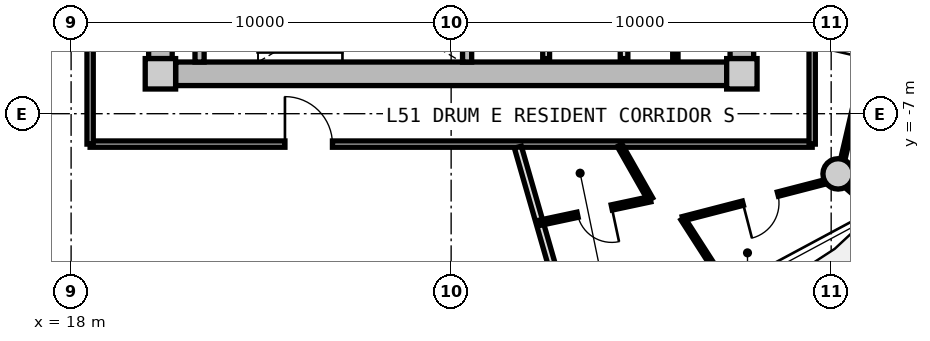
"""IFC4 building model, lengths in metres.
Left out: names, types, materials, properties, quantities, classifications, styles, units other than length and angle.
Written with IfcOpenShell. Run it as: python <this file> out.ifc"""

import sys

from ifc_helpers import new_model, si_unit, direction, frame, frame_2d, origin, origin_2d, place, context, subcontext, project, spatial, rectangle, circle, extrude, source, transform, mapped, element, fill, save


model = new_model("IFC4")
c1 = context("Model", 3, precision=1e-05, world=origin(), true_north=direction((0.0, 1.0)))
c2 = subcontext(c1, "Body", "Model", "MODEL_VIEW")
j1 = project(units=[si_unit("LENGTHUNIT", "METRE"), si_unit("PLANEANGLEUNIT", "RADIAN")], contexts=[c1])
p1 = place(None, origin())
s1 = spatial("IfcSite", under=j1, at=p1, CompositionType="ELEMENT")
p2 = place(p1, origin())
s2 = spatial("IfcBuilding", under=s1, at=p2, CompositionType="ELEMENT")
p3 = place(p2, frame((0.0, 0.0, 164.8)))
s3 = spatial("IfcBuildingStorey", under=s2, at=p3, CompositionType="ELEMENT", Elevation=164.8)
m1 = source(origin(), c2, "Body", "SweptSolid", [
    extrude(rectangle(XDim=0.8, YDim=0.8, at=origin_2d()), origin(), (0.0, 0.0, 1.0), 3.05),
])
for number, where, z_axis, x_axis in (
    (1, (20.35, -5.95, 0.0), (0.0, 0.0, 1.0), (1.0, 0.0, 0.0)),
    (2, (35.65, -5.95, 0.0), (0.0, 0.0, 1.0), (1.0, 0.0, 0.0)),
):
    element("IfcColumn", number, at=place(p3, frame(where, z_axis=z_axis, x_axis=x_axis)), inside=s3, PredefinedType="COLUMN", context=c2, shape_type="MappedRepresentation", body=[
        mapped(m1, transform((0.0, 0.0, 0.0), x_axis=(1.0, 0.0, 0.0), y_axis=(0.0, 1.0, 0.0), z_axis=(0.0, 0.0, 1.0), scale=1.0)),
    ])
m2 = source(origin(), c2, "Body", "SweptSolid", [
    extrude(rectangle(XDim=14.5, YDim=0.62, at=frame_2d((7.25, 0.0))), origin(), (0.0, 0.0, 1.0), 2.81),
])
p4 = place(p3, frame((35.25, -5.95, 0.0), z_axis=(0.0, 0.0, 1.0), x_axis=(-1.0, 0.0, 0.0)))
e3 = element("IfcWall", 3, at=p4, inside=s3, PredefinedType="SHEAR", context=c2, shape_type="MappedRepresentation", body=[
    mapped(m2, transform((0.0, 0.0, 0.0), x_axis=(1.0, 0.0, 0.0), y_axis=(0.0, 1.0, 0.0), z_axis=(0.0, 0.0, 1.0), scale=1.0)),
])
m3 = source(origin(), c2, "Body", "SweptSolid", [
    extrude(rectangle(XDim=11.1, YDim=0.62, at=frame_2d((5.55, 0.0))), origin(), (0.0, 0.0, 1.0), 2.81),
])
p5 = place(p3, frame((20.35, -5.55, 0.0), z_axis=(0.0, 0.0, 1.0), x_axis=(0.0, 1.0, 0.0)))
e4 = element("IfcWall", 4, at=p5, inside=s3, PredefinedType="SHEAR", context=c2, shape_type="MappedRepresentation", body=[
    mapped(m3, transform((0.0, 0.0, 0.0), x_axis=(1.0, 0.0, 0.0), y_axis=(0.0, 1.0, 0.0), z_axis=(0.0, 0.0, 1.0), scale=1.0)),
])
p6 = place(p5, frame((3.8, 0.0, 0.0)))
e5 = element("IfcOpeningElement", 5, at=p6, cuts=e4, PredefinedType="OPENING", context=c2, shape_type="SweptSolid", body=[
    extrude(rectangle(XDim=1.2, YDim=2.15, at=frame_2d((0.6, 1.075))), frame((0.0, 0.32, 0.0), z_axis=(0.0, -1.0, 0.0), x_axis=(1.0, 0.0, 0.0)), (0.0, 0.0, 1.0), 0.64),
])
p7 = place(p3, frame((35.65, 5.55, 0.0), z_axis=(0.0, 0.0, 1.0), x_axis=(0.0, -1.0, 0.0)))
e6 = element("IfcWall", 6, at=p7, inside=s3, PredefinedType="SHEAR", context=c2, shape_type="MappedRepresentation", body=[
    mapped(m3, transform((0.0, 0.0, 0.0), x_axis=(1.0, 0.0, 0.0), y_axis=(0.0, 1.0, 0.0), z_axis=(0.0, 0.0, 1.0), scale=1.0)),
])
p8 = place(p7, frame((5.65, 0.0, 0.0)))
e7 = element("IfcOpeningElement", 7, at=p8, cuts=e6, PredefinedType="OPENING", context=c2, shape_type="SweptSolid", body=[
    extrude(rectangle(XDim=1.2, YDim=2.15, at=frame_2d((0.6, 1.075))), frame((0.0, 0.32, 0.0), z_axis=(0.0, -1.0, 0.0), x_axis=(1.0, 0.0, 0.0)), (0.0, 0.0, 1.0), 0.64),
])
m4 = source(origin(), c2, "Body", "SweptSolid", [
    extrude(circle(Radius=0.4, at=origin_2d()), origin(), (0.0, 0.0, 1.0), 3.05),
])
p9 = place(p3, frame((38.183, -8.584, 0.0), z_axis=(0.0, 0.0, 1.0), x_axis=(1.0, 0.0, 0.0)))
e8 = element("IfcColumn", 8, at=p9, inside=s3, PredefinedType="COLUMN", context=c2, shape_type="MappedRepresentation", body=[
    mapped(m4, transform((0.0, 0.0, 0.0), x_axis=(1.0, 0.0, 0.0), y_axis=(0.0, 1.0, 0.0), z_axis=(0.0, 0.0, 1.0), scale=1.0)),
])
m5 = source(origin(), c2, "Body", "SweptSolid", [
    extrude(rectangle(XDim=3.19, YDim=0.24, at=frame_2d((1.595, 0.0))), origin(), (0.0, 0.0, 1.0), 2.81),
])
for number, where, z_axis, x_axis in (
    (9, (21.38, -5.64, 0.0), (0.0, 0.0, 1.0), (0.0, 1.0, 0.0)),
    (10, (28.42, -5.64, 0.0), (0.0, 0.0, 1.0), (0.0, 1.0, 0.0)),
):
    element("IfcWall", number, at=place(p3, frame(where, z_axis=z_axis, x_axis=x_axis)), inside=s3, PredefinedType="PARTITIONING", context=c2, shape_type="MappedRepresentation", body=[
        mapped(m5, transform((0.0, 0.0, 0.0), x_axis=(1.0, 0.0, 0.0), y_axis=(0.0, 1.0, 0.0), z_axis=(0.0, 0.0, 1.0), scale=1.0)),
    ])
m6 = source(origin(), c2, "Body", "SweptSolid", [
    extrude(rectangle(XDim=3.8, YDim=0.2, at=frame_2d((1.9, 0.0))), origin(), (0.0, 0.0, 1.0), 2.795),
])
p10 = place(p3, frame((32.55, -5.55, 0.0), z_axis=(0.0, 0.0, 1.0), x_axis=(0.0, 1.0, 0.0)))
e11 = element("IfcWall", 11, at=p10, inside=s3, PredefinedType="PARTITIONING", context=c2, shape_type="MappedRepresentation", body=[
    mapped(m6, transform((0.0, 0.0, 0.0), x_axis=(1.0, 0.0, 0.0), y_axis=(0.0, 1.0, 0.0), z_axis=(0.0, 0.0, 1.0), scale=1.0)),
])
m7 = source(origin(), c2, "Body", "SweptSolid", [
    extrude(rectangle(XDim=4.2, YDim=0.18, at=frame_2d((2.1, 0.0))), origin(), (0.0, 0.0, 1.0), 2.795),
])
p11 = place(p3, frame((30.5, -5.55, 0.0), z_axis=(0.0, 0.0, 1.0), x_axis=(0.0, 1.0, 0.0)))
e12 = element("IfcWall", 12, at=p11, inside=s3, PredefinedType="PARTITIONING", context=c2, shape_type="MappedRepresentation", body=[
    mapped(m7, transform((0.0, 0.0, 0.0), x_axis=(1.0, 0.0, 0.0), y_axis=(0.0, 1.0, 0.0), z_axis=(0.0, 0.0, 1.0), scale=1.0)),
])
m8 = source(origin(), c2, "Body", "SweptSolid", [
    extrude(rectangle(XDim=3.8, YDim=0.14, at=frame_2d((1.9, 0.0))), origin(), (0.0, 0.0, 1.0), 2.795),
])
p12 = place(p3, frame((33.9, -5.55, 0.0), z_axis=(0.0, 0.0, 1.0), x_axis=(0.0, 1.0, 0.0)))
e13 = element("IfcWall", 13, at=p12, inside=s3, PredefinedType="PARTITIONING", context=c2, shape_type="MappedRepresentation", body=[
    mapped(m8, transform((0.0, 0.0, 0.0), x_axis=(1.0, 0.0, 0.0), y_axis=(0.0, 1.0, 0.0), z_axis=(0.0, 0.0, 1.0), scale=1.0)),
])
m9 = source(origin(), c2, "Body", "SweptSolid", [
    extrude(rectangle(XDim=19.0, YDim=0.165, at=frame_2d((9.5, 0.0))), origin(), (0.0, 0.0, 1.0), 2.795),
])
p13 = place(p3, frame((37.5, -7.8, 0.0), z_axis=(0.0, 0.0, 1.0), x_axis=(-1.0, 0.0, 0.0)))
e14 = element("IfcWall", 14, at=p13, inside=s3, PredefinedType="PARTITIONING", context=c2, shape_type="MappedRepresentation", body=[
    mapped(m9, transform((0.0, 0.0, 0.0), x_axis=(1.0, 0.0, 0.0), y_axis=(0.0, 1.0, 0.0), z_axis=(0.0, 0.0, 1.0), scale=1.0)),
])
p14 = place(p13, frame((12.623, 0.0, 0.0)))
e15 = element("IfcOpeningElement", 15, at=p14, cuts=e14, PredefinedType="OPENING", context=c2, shape_type="SweptSolid", body=[
    extrude(rectangle(XDim=1.25, YDim=2.2, at=frame_2d((0.625, 1.1))), frame((0.0, 0.093, 0.0), z_axis=(0.0, -1.0, 0.0), x_axis=(1.0, 0.0, 0.0)), (0.0, 0.0, 1.0), 0.185),
])
m10 = source(origin(), c2, "Body", "SweptSolid", [
    extrude(rectangle(XDim=7.365, YDim=0.165, at=frame_2d((3.682, 0.0))), origin(), (0.0, 0.0, 1.0), 2.795),
])
p15 = place(p3, frame((18.5, -7.8, 0.0), z_axis=(0.0, 0.0, 1.0), x_axis=(0.0, 1.0, 0.0)))
e16 = element("IfcWall", 16, at=p15, inside=s3, PredefinedType="PARTITIONING", context=c2, shape_type="MappedRepresentation", body=[
    mapped(m10, transform((0.0, 0.0, 0.0), x_axis=(1.0, 0.0, 0.0), y_axis=(0.0, 1.0, 0.0), z_axis=(0.0, 0.0, 1.0), scale=1.0)),
])
m11 = source(origin(), c2, "Body", "SweptSolid", [
    extrude(rectangle(XDim=6.88, YDim=0.165, at=frame_2d((3.44, 0.0))), origin(), (0.0, 0.0, 1.0), 2.795),
])
p16 = place(p3, frame((37.5, -0.92, 0.0), z_axis=(0.0, 0.0, 1.0), x_axis=(0.0, -1.0, 0.0)))
e17 = element("IfcWall", 17, at=p16, inside=s3, PredefinedType="PARTITIONING", context=c2, shape_type="MappedRepresentation", body=[
    mapped(m11, transform((0.0, 0.0, 0.0), x_axis=(1.0, 0.0, 0.0), y_axis=(0.0, 1.0, 0.0), z_axis=(0.0, 0.0, 1.0), scale=1.0)),
])
p17 = place(p16, frame((2.915, 0.0, 0.0)))
e18 = element("IfcOpeningElement", 18, at=p17, cuts=e17, PredefinedType="OPENING", context=c2, shape_type="SweptSolid", body=[
    extrude(rectangle(XDim=1.05, YDim=2.15, at=frame_2d((0.525, 1.075))), frame((0.0, 0.093, 0.0), z_axis=(0.0, -1.0, 0.0), x_axis=(1.0, 0.0, 0.0)), (0.0, 0.0, 1.0), 0.185),
])
m12 = source(origin(), c2, "Body", "SweptSolid", [
    extrude(rectangle(XDim=6.035, YDim=0.19, at=frame_2d((3.018, 0.0))), origin(), (0.0, 0.0, 1.0), 2.345),
])
p18 = place(p3, frame((29.756, -7.88, 0.0), z_axis=(0.0, 0.0, 1.0), x_axis=(0.276809454862, -0.960924828329, 0.0)))
e19 = element("IfcWall", 19, at=p18, inside=s3, PredefinedType="PARTITIONING", context=c2, shape_type="MappedRepresentation", body=[
    mapped(m12, transform((0.0, 0.0, 0.0), x_axis=(1.0, 0.0, 0.0), y_axis=(0.0, 1.0, 0.0), z_axis=(0.0, 0.0, 1.0), scale=1.0)),
])
m13 = source(origin(), c2, "Body", "SweptSolid", [
    extrude(rectangle(XDim=7.469, YDim=0.115, at=frame_2d((3.734, 0.0))), origin(), (0.0, 0.0, 1.0), 2.795),
])
p19 = place(p3, frame((38.187, -8.715, 0.0), z_axis=(0.0, 0.0, 1.0), x_axis=(0.226790420763, 0.973943584121, 0.0)))
e20 = element("IfcWall", 20, at=p19, inside=s3, PredefinedType="PARTITIONING", context=c2, shape_type="MappedRepresentation", body=[
    mapped(m13, transform((0.0, 0.0, 0.0), x_axis=(1.0, 0.0, 0.0), y_axis=(0.0, 1.0, 0.0), z_axis=(0.0, 0.0, 1.0), scale=1.0)),
])
p20 = place(p19, frame((3.259, 0.0, 0.0)))
e21 = element("IfcOpeningElement", 21, at=p20, cuts=e20, PredefinedType="OPENING", context=c2, shape_type="SweptSolid", body=[
    extrude(rectangle(XDim=0.95, YDim=2.1, at=frame_2d((0.475, 1.05))), frame((0.0, 0.067, 0.0), z_axis=(0.0, -1.0, 0.0), x_axis=(1.0, 0.0, 0.0)), (0.0, 0.0, 1.0), 0.135),
])
m14 = source(origin(), c2, "Body", "SweptSolid", [
    extrude(rectangle(XDim=1.258, YDim=0.115, at=frame_2d((0.629, 0.0))), origin(), (0.0, 0.0, 1.0), 2.795),
])
p21 = place(p3, frame((38.187, -8.715, 0.0), z_axis=(0.0, 0.0, 1.0), x_axis=(0.755765923317, -0.654841865761, 0.0)))
e22 = element("IfcWall", 22, at=p21, inside=s3, PredefinedType="PARTITIONING", context=c2, shape_type="MappedRepresentation", body=[
    mapped(m14, transform((0.0, 0.0, 0.0), x_axis=(1.0, 0.0, 0.0), y_axis=(0.0, 1.0, 0.0), z_axis=(0.0, 0.0, 1.0), scale=1.0)),
])
m15 = source(origin(), c2, "Body", "SweptSolid", [
    extrude(rectangle(XDim=1.635, YDim=0.14, at=frame_2d((0.817, 0.0))), origin(), (0.0, 0.0, 1.0), 2.795),
])
p22 = place(p3, frame((32.434, -7.83, 0.0), z_axis=(0.0, 0.0, 1.0), x_axis=(0.494078690764, -0.869417188312, 0.0)))
e23 = element("IfcWall", 23, at=p22, inside=s3, PredefinedType="PARTITIONING", context=c2, shape_type="MappedRepresentation", body=[
    mapped(m15, transform((0.0, 0.0, 0.0), x_axis=(1.0, 0.0, 0.0), y_axis=(0.0, 1.0, 0.0), z_axis=(0.0, 0.0, 1.0), scale=1.0)),
])
m16 = source(origin(), c2, "Body", "SweptSolid", [
    extrude(rectangle(XDim=2.995, YDim=0.14, at=frame_2d((1.498, 0.0))), origin(), (0.0, 0.0, 1.0), 2.435),
])
p23 = place(p3, frame((33.241, -9.251, 0.0), z_axis=(0.0, 0.0, 1.0), x_axis=(-0.978075914325, -0.208248663425, 0.0)))
e24 = element("IfcWall", 24, at=p23, inside=s3, PredefinedType="PARTITIONING", context=c2, shape_type="MappedRepresentation", body=[
    mapped(m16, transform((0.0, 0.0, 0.0), x_axis=(1.0, 0.0, 0.0), y_axis=(0.0, 1.0, 0.0), z_axis=(0.0, 0.0, 1.0), scale=1.0)),
])
p24 = place(p23, frame((1.038, 0.0, 0.0)))
e25 = element("IfcOpeningElement", 25, at=p24, cuts=e24, PredefinedType="OPENING", context=c2, shape_type="SweptSolid", body=[
    extrude(rectangle(XDim=0.92, YDim=2.1, at=frame_2d((0.46, 1.05))), frame((0.0, 0.08, 0.0), z_axis=(0.0, -1.0, 0.0), x_axis=(1.0, 0.0, 0.0)), (0.0, 0.0, 1.0), 0.16),
])
m17 = source(origin(), c2, "Body", "SweptSolid", [
    extrude(rectangle(XDim=2.194, YDim=0.115, at=frame_2d((1.097, 0.0))), origin(), (0.0, 0.0, 1.0), 2.795),
])
p25 = place(p3, frame((34.095, -9.764, 0.0), z_axis=(0.0, 0.0, 1.0), x_axis=(0.540858831194, -0.841113383985, 0.0)))
e26 = element("IfcWall", 26, at=p25, inside=s3, PredefinedType="PARTITIONING", context=c2, shape_type="MappedRepresentation", body=[
    mapped(m17, transform((0.0, 0.0, 0.0), x_axis=(1.0, 0.0, 0.0), y_axis=(0.0, 1.0, 0.0), z_axis=(0.0, 0.0, 1.0), scale=1.0)),
])
m18 = source(origin(), c2, "Body", "SweptSolid", [
    extrude(rectangle(XDim=4.218, YDim=0.115, at=frame_2d((2.109, 0.0))), origin(), (0.0, 0.0, 1.0), 2.345),
])
p26 = place(p3, frame((34.095, -9.764, 0.0), z_axis=(0.0, 0.0, 1.0), x_axis=(0.968124892577, 0.250467946797, 0.0)))
e27 = element("IfcWall", 27, at=p26, inside=s3, PredefinedType="PARTITIONING", context=c2, shape_type="MappedRepresentation", body=[
    mapped(m18, transform((0.0, 0.0, 0.0), x_axis=(1.0, 0.0, 0.0), y_axis=(0.0, 1.0, 0.0), z_axis=(0.0, 0.0, 1.0), scale=1.0)),
])
p27 = place(p26, frame((1.634, 0.0, 0.0)))
e28 = element("IfcOpeningElement", 28, at=p27, cuts=e27, PredefinedType="OPENING", context=c2, shape_type="SweptSolid", body=[
    extrude(rectangle(XDim=0.95, YDim=2.1, at=frame_2d((0.475, 1.05))), frame((0.0, 0.067, 0.0), z_axis=(0.0, -1.0, 0.0), x_axis=(1.0, 0.0, 0.0)), (0.0, 0.0, 1.0), 0.135),
])
m19 = source(origin(), c2, "Body", "SweptSolid", [
    extrude(rectangle(XDim=1.25, YDim=2.2, at=frame_2d((0.625, 1.1))), frame((0.0, 0.025, 0.0), z_axis=(0.0, -1.0, 0.0), x_axis=(1.0, 0.0, 0.0)), (0.0, 0.0, 1.0), 0.05),
])
p28 = place(p14, frame((1.25, 0.0, 0.0), z_axis=(0.0, 0.0, 1.0), x_axis=(-1.0, 0.0, 0.0)))
e29 = element("IfcDoor", 29, at=p28, inside=s3, OperationType="SINGLE_SWING_LEFT", PredefinedType="DOOR", context=c2, shape_type="MappedRepresentation", body=[
    mapped(m19, transform((0.0, 0.0, 0.0), x_axis=(1.0, 0.0, 0.0), y_axis=(0.0, 1.0, 0.0), z_axis=(0.0, 0.0, 1.0), scale=1.0)),
])
fill(e15, e29)
m20 = source(origin(), c2, "Body", "SweptSolid", [
    extrude(rectangle(XDim=0.92, YDim=2.1, at=frame_2d((0.46, 1.05))), frame((0.0, 0.025, 0.0), z_axis=(0.0, -1.0, 0.0), x_axis=(1.0, 0.0, 0.0)), (0.0, 0.0, 1.0), 0.05),
])
p29 = place(p24, origin())
e30 = element("IfcDoor", 30, at=p29, inside=s3, OperationType="SINGLE_SWING_LEFT", PredefinedType="DOOR", context=c2, shape_type="MappedRepresentation", body=[
    mapped(m20, transform((0.0, 0.0, 0.0), x_axis=(1.0, 0.0, 0.0), y_axis=(0.0, 1.0, 0.0), z_axis=(0.0, 0.0, 1.0), scale=1.0)),
])
fill(e25, e30)
m21 = source(origin(), c2, "Body", "SweptSolid", [
    extrude(rectangle(XDim=0.95, YDim=2.1, at=frame_2d((0.475, 1.05))), frame((0.0, 0.025, 0.0), z_axis=(0.0, -1.0, 0.0), x_axis=(1.0, 0.0, 0.0)), (0.0, 0.0, 1.0), 0.05),
])
p30 = place(p27, frame((0.95, 0.0, 0.0), z_axis=(0.0, 0.0, 1.0), x_axis=(-1.0, 0.0, 0.0)))
e31 = element("IfcDoor", 31, at=p30, inside=s3, OperationType="SINGLE_SWING_RIGHT", PredefinedType="DOOR", context=c2, shape_type="MappedRepresentation", body=[
    mapped(m21, transform((0.0, 0.0, 0.0), x_axis=(1.0, 0.0, 0.0), y_axis=(0.0, 1.0, 0.0), z_axis=(0.0, 0.0, 1.0), scale=1.0)),
])
fill(e28, e31)
save(model, sys.argv[1])
